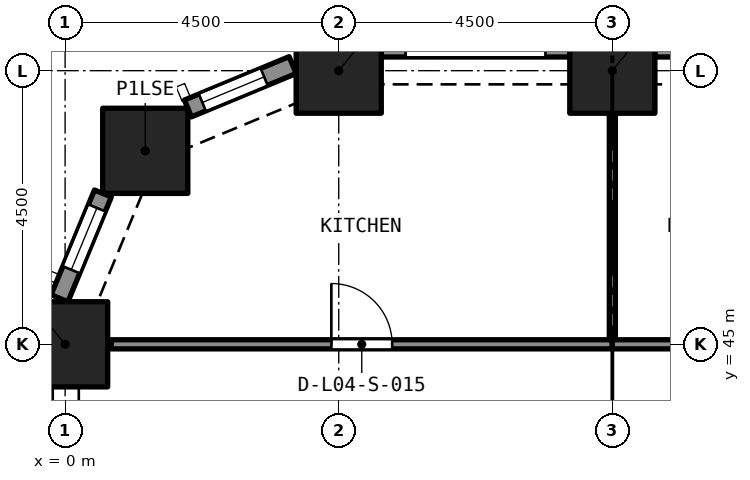
"""IFC4 building model, lengths in metres.
Left out: names, types, materials, properties, quantities, classifications, styles, units other than length and angle.
Written with IfcOpenShell. Run it as: python <this file> out.ifc"""

import sys

from ifc_helpers import new_model, si_unit, direction, frame, frame_2d, origin, origin_2d, place, context, subcontext, project, spatial, rectangle, extrude, element, fill, save


model = new_model("IFC4")
c1 = context("Model", 3, precision=1e-05, world=origin(), true_north=direction((0.0, 1.0)))
c2 = subcontext(c1, "Body", "Model", "MODEL_VIEW")
j1 = project(units=[si_unit("LENGTHUNIT", "METRE"), si_unit("PLANEANGLEUNIT", "RADIAN")], contexts=[c1])
p1 = place(None, origin())
s1 = spatial("IfcSite", under=j1, at=p1, CompositionType="ELEMENT")
p2 = place(p1, origin())
s2 = spatial("IfcBuilding", under=s1, at=p2, CompositionType="ELEMENT")
p3 = place(p2, frame((0.0, 0.0, 21.0)))
s3 = spatial("IfcBuildingStorey", under=s2, at=p3, CompositionType="ELEMENT", Elevation=21.0)
for number, where, z_axis, x_axis in (
    (1, (0.0, 45.0, 0.0), (0.0, 0.0, 1.0), (1.0, 0.0, 0.0)),
    (2, (1.318, 48.182, 0.0), (0.0, 0.0, 1.0), (1.0, 0.0, 0.0)),
    (3, (4.5, 49.5, 0.0), (0.0, 0.0, 1.0), (1.0, 0.0, 0.0)),
    (4, (9.0, 49.5, 0.0), (0.0, 0.0, 1.0), (1.0, 0.0, 0.0)),
):
    element("IfcColumn", number, at=place(p3, frame(where, z_axis=z_axis, x_axis=x_axis)), inside=s3, PredefinedType="COLUMN", context=c2, shape_type="SweptSolid", body=[
        extrude(rectangle(XDim=1.4, YDim=1.4, at=origin_2d()), origin(), (0.0, 0.0, 1.0), 5.0),
    ])
p4 = place(p3, frame((9.7, 49.875, 0.0), z_axis=(0.0, 0.0, 1.0), x_axis=(1.0, 0.0, 0.0)))
e5 = element("IfcWall", 5, at=p4, inside=s3, PredefinedType="SOLIDWALL", context=c2, shape_type="SweptSolid", body=[
    extrude(rectangle(XDim=3.1, YDim=0.3, at=frame_2d((1.55, 0.0))), origin(), (0.0, 0.0, 1.0), 5.0),
])
p5 = place(p4, frame((0.4, 0.0, 0.45)))
e6 = element("IfcOpeningElement", 6, at=p5, cuts=e5, PredefinedType="OPENING", context=c2, shape_type="SweptSolid", body=[
    extrude(rectangle(XDim=2.3, YDim=3.3, at=frame_2d((1.15, 1.65))), frame((0.0, 0.16, 0.0), z_axis=(0.0, -1.0, 0.0), x_axis=(1.0, 0.0, 0.0)), (0.0, 0.0, 1.0), 0.32),
])
p6 = place(p3, frame((5.2, 49.875, 0.0), z_axis=(0.0, 0.0, 1.0), x_axis=(1.0, 0.0, 0.0)))
e7 = element("IfcWall", 7, at=p6, inside=s3, PredefinedType="SOLIDWALL", context=c2, shape_type="SweptSolid", body=[
    extrude(rectangle(XDim=3.1, YDim=0.3, at=frame_2d((1.55, 0.0))), origin(), (0.0, 0.0, 1.0), 5.0),
])
p7 = place(p6, frame((0.4, 0.0, 0.45)))
e8 = element("IfcOpeningElement", 8, at=p7, cuts=e7, PredefinedType="OPENING", context=c2, shape_type="SweptSolid", body=[
    extrude(rectangle(XDim=2.3, YDim=3.3, at=frame_2d((1.15, 1.65))), frame((0.0, 0.16, 0.0), z_axis=(0.0, -1.0, 0.0), x_axis=(1.0, 0.0, 0.0)), (0.0, 0.0, 1.0), 0.32),
])
p8 = place(p3, frame((2.02, 48.878, 0.0), z_axis=(0.0, 0.0, 1.0), x_axis=(0.923903565336, 0.38262540684, 0.0)))
e9 = element("IfcWall", 9, at=p8, inside=s3, PredefinedType="SOLIDWALL", context=c2, shape_type="SweptSolid", body=[
    extrude(rectangle(XDim=1.865, YDim=0.3, at=frame_2d((0.933, 0.0))), origin(), (0.0, 0.0, 1.0), 5.0),
])
p9 = place(p8, frame((0.258, 0.0, 0.45)))
e10 = element("IfcOpeningElement", 10, at=p9, cuts=e9, PredefinedType="OPENING", context=c2, shape_type="SweptSolid", body=[
    extrude(rectangle(XDim=1.1, YDim=3.3, at=frame_2d((0.55, 1.65))), frame((0.0, 0.16, 0.0), z_axis=(0.0, -1.0, 0.0), x_axis=(1.0, 0.0, 0.0)), (0.0, 0.0, 1.0), 0.32),
])
p10 = place(p3, frame((-0.092, 45.757, 0.0), z_axis=(0.0, 0.0, 1.0), x_axis=(0.382737135771, 0.923857286003, 0.0)))
e11 = element("IfcWall", 11, at=p10, inside=s3, PredefinedType="SOLIDWALL", context=c2, shape_type="SweptSolid", body=[
    extrude(rectangle(XDim=1.865, YDim=0.3, at=frame_2d((0.933, 0.0))), origin(), (0.0, 0.0, 1.0), 5.0),
])
p11 = place(p10, frame((0.508, 0.0, 0.45)))
e12 = element("IfcOpeningElement", 12, at=p11, cuts=e11, PredefinedType="OPENING", context=c2, shape_type="SweptSolid", body=[
    extrude(rectangle(XDim=1.1, YDim=3.3, at=frame_2d((0.55, 1.65))), frame((0.0, 0.16, 0.0), z_axis=(0.0, -1.0, 0.0), x_axis=(1.0, 0.0, 0.0)), (0.0, 0.0, 1.0), 0.32),
])
p12 = place(p3, frame((9.0, 45.075, 0.0), z_axis=(0.0, 0.0, 1.0), x_axis=(0.0, 1.0, 0.0)))
e13 = element("IfcWall", 13, at=p12, inside=s3, PredefinedType="PARTITIONING", context=c2, shape_type="SweptSolid", body=[
    extrude(rectangle(XDim=3.725, YDim=0.1, at=frame_2d((1.863, 0.0))), origin(), (0.0, 0.0, 1.0), 4.65),
])
p13 = place(p3, frame((0.758, 45.0, 0.0), z_axis=(0.0, 0.0, 1.0), x_axis=(1.0, 0.0, 0.0)))
e14 = element("IfcWall", 14, at=p13, inside=s3, PredefinedType="PARTITIONING", context=c2, shape_type="SweptSolid", body=[
    extrude(rectangle(XDim=8.242, YDim=0.15, at=frame_2d((4.121, 0.0))), origin(), (0.0, 0.0, 1.0), 4.65),
])
p14 = place(p13, frame((3.621, 0.0, 0.0)))
e15 = element("IfcOpeningElement", 15, at=p14, cuts=e14, PredefinedType="OPENING", context=c2, shape_type="SweptSolid", body=[
    extrude(rectangle(XDim=1.0, YDim=2.1, at=frame_2d((0.5, 1.05))), frame((0.0, 0.085, 0.0), z_axis=(0.0, -1.0, 0.0), x_axis=(1.0, 0.0, 0.0)), (0.0, 0.0, 1.0), 0.17),
])
p15 = place(p3, frame((9.0, 45.0, 0.0), z_axis=(0.0, 0.0, 1.0), x_axis=(1.0, 0.0, 0.0)))
e16 = element("IfcWall", 16, at=p15, inside=s3, PredefinedType="PARTITIONING", context=c2, shape_type="SweptSolid", body=[
    extrude(rectangle(XDim=4.5, YDim=0.15, at=frame_2d((2.25, 0.0))), origin(), (0.0, 0.0, 1.0), 4.65),
])
p16 = place(p15, frame((1.75, 0.0, 0.0)))
e17 = element("IfcOpeningElement", 17, at=p16, cuts=e16, PredefinedType="OPENING", context=c2, shape_type="SweptSolid", body=[
    extrude(rectangle(XDim=1.0, YDim=2.1, at=frame_2d((0.5, 1.05))), frame((0.0, 0.085, 0.0), z_axis=(0.0, -1.0, 0.0), x_axis=(1.0, 0.0, 0.0)), (0.0, 0.0, 1.0), 0.17),
])
p17 = place(p9, origin())
e18 = element("IfcWindow", 18, at=p17, inside=s3, PartitioningType="SINGLE_PANEL", PredefinedType="WINDOW", context=c2, shape_type="SweptSolid", body=[
    extrude(rectangle(XDim=1.1, YDim=3.3, at=frame_2d((0.55, 1.65))), frame((0.0, 0.03, 0.0), z_axis=(0.0, -1.0, 0.0), x_axis=(1.0, 0.0, 0.0)), (0.0, 0.0, 1.0), 0.06),
])
fill(e10, e18)
p18 = place(p11, origin())
e19 = element("IfcWindow", 19, at=p18, inside=s3, PartitioningType="SINGLE_PANEL", PredefinedType="WINDOW", context=c2, shape_type="SweptSolid", body=[
    extrude(rectangle(XDim=1.1, YDim=3.3, at=frame_2d((0.55, 1.65))), frame((0.0, 0.03, 0.0), z_axis=(0.0, -1.0, 0.0), x_axis=(1.0, 0.0, 0.0)), (0.0, 0.0, 1.0), 0.06),
])
fill(e12, e19)
p19 = place(p14, origin())
e20 = element("IfcDoor", 20, at=p19, inside=s3, OperationType="SINGLE_SWING_RIGHT", PredefinedType="DOOR", context=c2, shape_type="SweptSolid", body=[
    extrude(rectangle(XDim=1.0, YDim=2.1, at=frame_2d((0.5, 1.05))), frame((0.0, 0.025, 0.0), z_axis=(0.0, -1.0, 0.0), x_axis=(1.0, 0.0, 0.0)), (0.0, 0.0, 1.0), 0.05),
])
fill(e15, e20)
save(model, sys.argv[1])
